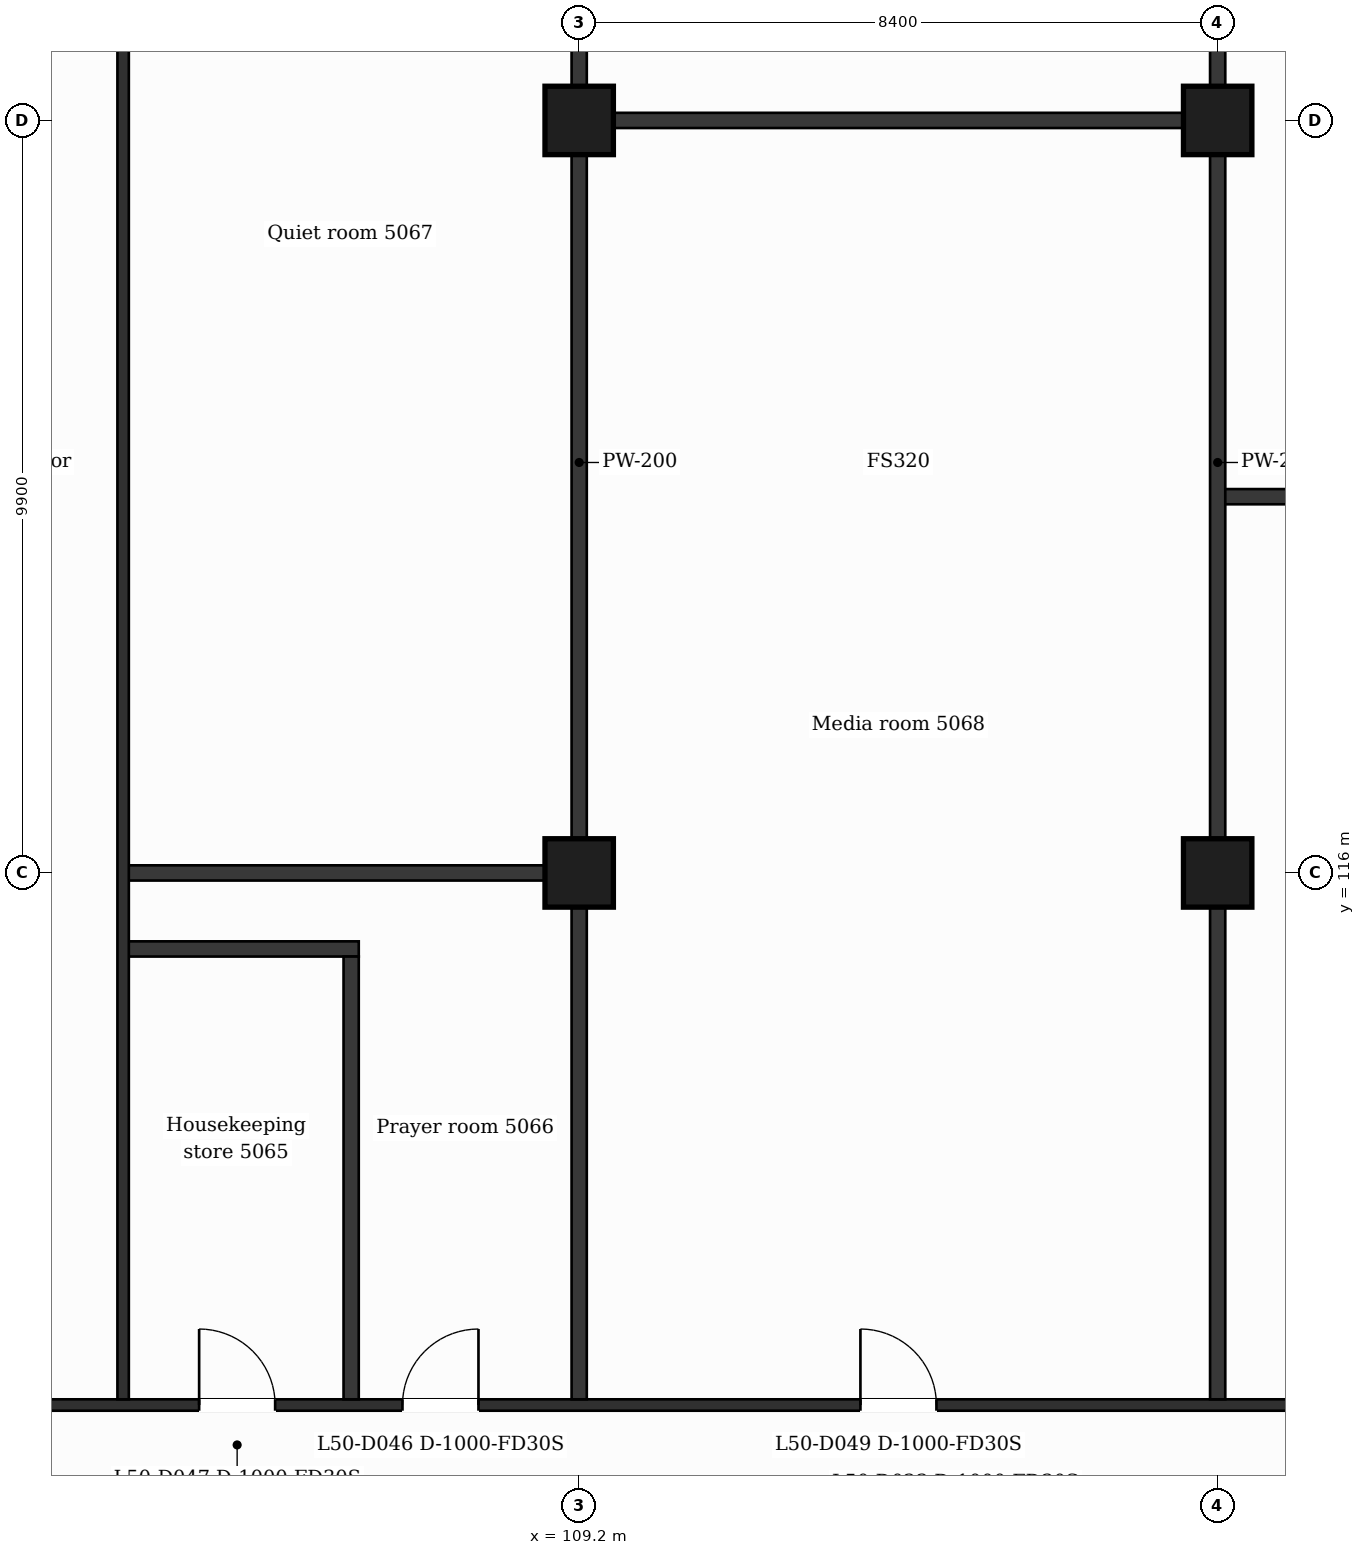
"""IFC4 building model, lengths in metres.
Left out: names, types, materials, properties, quantities, classifications, styles, units other than length and angle.
Written with IfcOpenShell. Run it as: python <this file> out.ifc"""

import sys

from ifc_helpers import new_model, si_unit, direction, frame, frame_2d, origin, origin_2d, place, context, subcontext, project, spatial, rectangle, extrude, element, fill, save


model = new_model("IFC4")
c1 = context("Model", 3, precision=1e-05, world=origin(), true_north=direction((0.0, 1.0)))
c2 = subcontext(c1, "Body", "Model", "MODEL_VIEW")
j1 = project(units=[si_unit("LENGTHUNIT", "METRE"), si_unit("PLANEANGLEUNIT", "RADIAN")], contexts=[c1])
p1 = place(None, origin())
s1 = spatial("IfcSite", under=j1, at=p1, CompositionType="ELEMENT")
p2 = place(p1, origin())
s2 = spatial("IfcBuilding", under=s1, at=p2, CompositionType="ELEMENT")
p3 = place(p2, frame((0.0, 0.0, 209.6)))
s3 = spatial("IfcBuildingStorey", under=s2, at=p3, CompositionType="ELEMENT", Elevation=209.6)
for number, where, z_axis, x_axis in (
    (1, (109.2, 116.0, 0.0), (0.0, 0.0, 1.0), (1.0, 0.0, 0.0)),
    (2, (117.6, 116.0, 0.0), (0.0, 0.0, 1.0), (1.0, 0.0, 0.0)),
    (3, (109.2, 125.9, 0.0), (0.0, 0.0, 1.0), (1.0, 0.0, 0.0)),
    (4, (117.6, 125.9, 0.0), (0.0, 0.0, 1.0), (1.0, 0.0, 0.0)),
):
    element("IfcColumn", number, at=place(p3, frame(where, z_axis=z_axis, x_axis=x_axis)), inside=s3, PredefinedType="COLUMN", context=c2, shape_type="SweptSolid", body=[
        extrude(rectangle(XDim=0.9, YDim=0.9, at=origin_2d()), origin(), (0.0, 0.0, 1.0), 3.7),
    ])
p4 = place(p3, frame((100.725, 109.0, 0.0), z_axis=(0.0, 0.0, 1.0), x_axis=(1.0, 0.0, 0.0)))
e5 = element("IfcWall", 5, at=p4, inside=s3, PredefinedType="PARTITIONING", context=c2, shape_type="SweptSolid", body=[
    extrude(rectangle(XDim=25.35, YDim=0.15, at=frame_2d((12.675, 0.0))), origin(), (0.0, 0.0, 1.0), 3.38),
])
p5 = place(p4, frame((6.15, 0.0, 0.0)))
e6 = element("IfcOpeningElement", 6, at=p5, cuts=e5, PredefinedType="OPENING", context=c2, shape_type="SweptSolid", body=[
    extrude(rectangle(XDim=1.0, YDim=2.1, at=frame_2d((0.5, 1.05))), frame((0.0, 0.085, 0.0), z_axis=(0.0, -1.0, 0.0), x_axis=(1.0, 0.0, 0.0)), (0.0, 0.0, 1.0), 0.17),
])
p6 = place(p4, frame((3.475, 0.0, 0.0)))
e7 = element("IfcOpeningElement", 7, at=p6, cuts=e5, PredefinedType="OPENING", context=c2, shape_type="SweptSolid", body=[
    extrude(rectangle(XDim=1.0, YDim=2.1, at=frame_2d((0.5, 1.05))), frame((0.0, 0.085, 0.0), z_axis=(0.0, -1.0, 0.0), x_axis=(1.0, 0.0, 0.0)), (0.0, 0.0, 1.0), 0.17),
])
p7 = place(p4, frame((12.175, 0.0, 0.0)))
e8 = element("IfcOpeningElement", 8, at=p7, cuts=e5, PredefinedType="OPENING", context=c2, shape_type="SweptSolid", body=[
    extrude(rectangle(XDim=1.0, YDim=2.1, at=frame_2d((0.5, 1.05))), frame((0.0, 0.085, 0.0), z_axis=(0.0, -1.0, 0.0), x_axis=(1.0, 0.0, 0.0)), (0.0, 0.0, 1.0), 0.17),
])
p8 = place(p4, frame((20.45, 0.0, 0.0)))
e9 = element("IfcOpeningElement", 9, at=p8, cuts=e5, PredefinedType="OPENING", context=c2, shape_type="SweptSolid", body=[
    extrude(rectangle(XDim=1.0, YDim=2.1, at=frame_2d((0.5, 1.05))), frame((0.0, 0.085, 0.0), z_axis=(0.0, -1.0, 0.0), x_axis=(1.0, 0.0, 0.0)), (0.0, 0.0, 1.0), 0.17),
])
p9 = place(p3, frame((103.2, 115.0, 0.0), z_axis=(0.0, 0.0, 1.0), x_axis=(1.0, 0.0, 0.0)))
e10 = element("IfcWall", 10, at=p9, inside=s3, PredefinedType="PARTITIONING", context=c2, shape_type="SweptSolid", body=[
    extrude(rectangle(XDim=3.1, YDim=0.2, at=frame_2d((1.55, 0.0))), origin(), (0.0, 0.0, 1.0), 3.38),
])
for number, where, z_axis, x_axis in (
    (11, (103.2, 116.0, 0.0), (0.0, 0.0, 1.0), (1.0, 0.0, 0.0)),
    (12, (117.6, 120.95, 0.0), (0.0, 0.0, 1.0), (1.0, 0.0, 0.0)),
):
    element("IfcWall", number, at=place(p3, frame(where, z_axis=z_axis, x_axis=x_axis)), inside=s3, PredefinedType="PARTITIONING", context=c2, shape_type="SweptSolid", body=[
        extrude(rectangle(XDim=6.0, YDim=0.2, at=frame_2d((3.0, 0.0))), origin(), (0.0, 0.0, 1.0), 3.38),
    ])
p10 = place(p3, frame((109.2, 125.9, 0.0), z_axis=(0.0, 0.0, 1.0), x_axis=(1.0, 0.0, 0.0)))
e13 = element("IfcWall", 13, at=p10, inside=s3, PredefinedType="PARTITIONING", context=c2, shape_type="SweptSolid", body=[
    extrude(rectangle(XDim=8.4, YDim=0.2, at=frame_2d((4.2, 0.0))), origin(), (0.0, 0.0, 1.0), 3.38),
])
p11 = place(p3, frame((103.2, 109.075, 0.0), z_axis=(0.0, 0.0, 1.0), x_axis=(0.0, 1.0, 0.0)))
e14 = element("IfcWall", 14, at=p11, inside=s3, PredefinedType="PARTITIONING", context=c2, shape_type="SweptSolid", body=[
    extrude(rectangle(XDim=24.65, YDim=0.15, at=frame_2d((12.325, 0.0))), origin(), (0.0, 0.0, 1.0), 3.38),
])
p12 = place(p3, frame((106.2, 109.075, 0.0), z_axis=(0.0, 0.0, 1.0), x_axis=(0.0, 1.0, 0.0)))
e15 = element("IfcWall", 15, at=p12, inside=s3, PredefinedType="PARTITIONING", context=c2, shape_type="SweptSolid", body=[
    extrude(rectangle(XDim=5.825, YDim=0.2, at=frame_2d((2.913, 0.0))), origin(), (0.0, 0.0, 1.0), 3.38),
])
for number, where, z_axis, x_axis in (
    (16, (109.2, 109.075, 0.0), (0.0, 0.0, 1.0), (0.0, 1.0, 0.0)),
    (17, (117.6, 109.075, 0.0), (0.0, 0.0, 1.0), (0.0, 1.0, 0.0)),
):
    element("IfcWall", number, at=place(p3, frame(where, z_axis=z_axis, x_axis=x_axis)), inside=s3, PredefinedType="PARTITIONING", context=c2, shape_type="SweptSolid", body=[
        extrude(rectangle(XDim=24.65, YDim=0.2, at=frame_2d((12.325, 0.0))), origin(), (0.0, 0.0, 1.0), 3.38),
    ])
p13 = place(p5, origin())
e18 = element("IfcDoor", 18, at=p13, inside=s3, OperationType="SINGLE_SWING_RIGHT", PredefinedType="DOOR", context=c2, shape_type="SweptSolid", body=[
    extrude(rectangle(XDim=1.0, YDim=2.1, at=frame_2d((0.5, 1.05))), frame((0.0, 0.025, 0.0), z_axis=(0.0, -1.0, 0.0), x_axis=(1.0, 0.0, 0.0)), (0.0, 0.0, 1.0), 0.05),
])
fill(e6, e18)
p14 = place(p6, origin())
e19 = element("IfcDoor", 19, at=p14, inside=s3, OperationType="SINGLE_SWING_LEFT", PredefinedType="DOOR", context=c2, shape_type="SweptSolid", body=[
    extrude(rectangle(XDim=1.0, YDim=2.1, at=frame_2d((0.5, 1.05))), frame((0.0, 0.025, 0.0), z_axis=(0.0, -1.0, 0.0), x_axis=(1.0, 0.0, 0.0)), (0.0, 0.0, 1.0), 0.05),
])
fill(e7, e19)
p15 = place(p7, origin())
e20 = element("IfcDoor", 20, at=p15, inside=s3, OperationType="SINGLE_SWING_LEFT", PredefinedType="DOOR", context=c2, shape_type="SweptSolid", body=[
    extrude(rectangle(XDim=1.0, YDim=2.1, at=frame_2d((0.5, 1.05))), frame((0.0, 0.025, 0.0), z_axis=(0.0, -1.0, 0.0), x_axis=(1.0, 0.0, 0.0)), (0.0, 0.0, 1.0), 0.05),
])
fill(e8, e20)
save(model, sys.argv[1])
